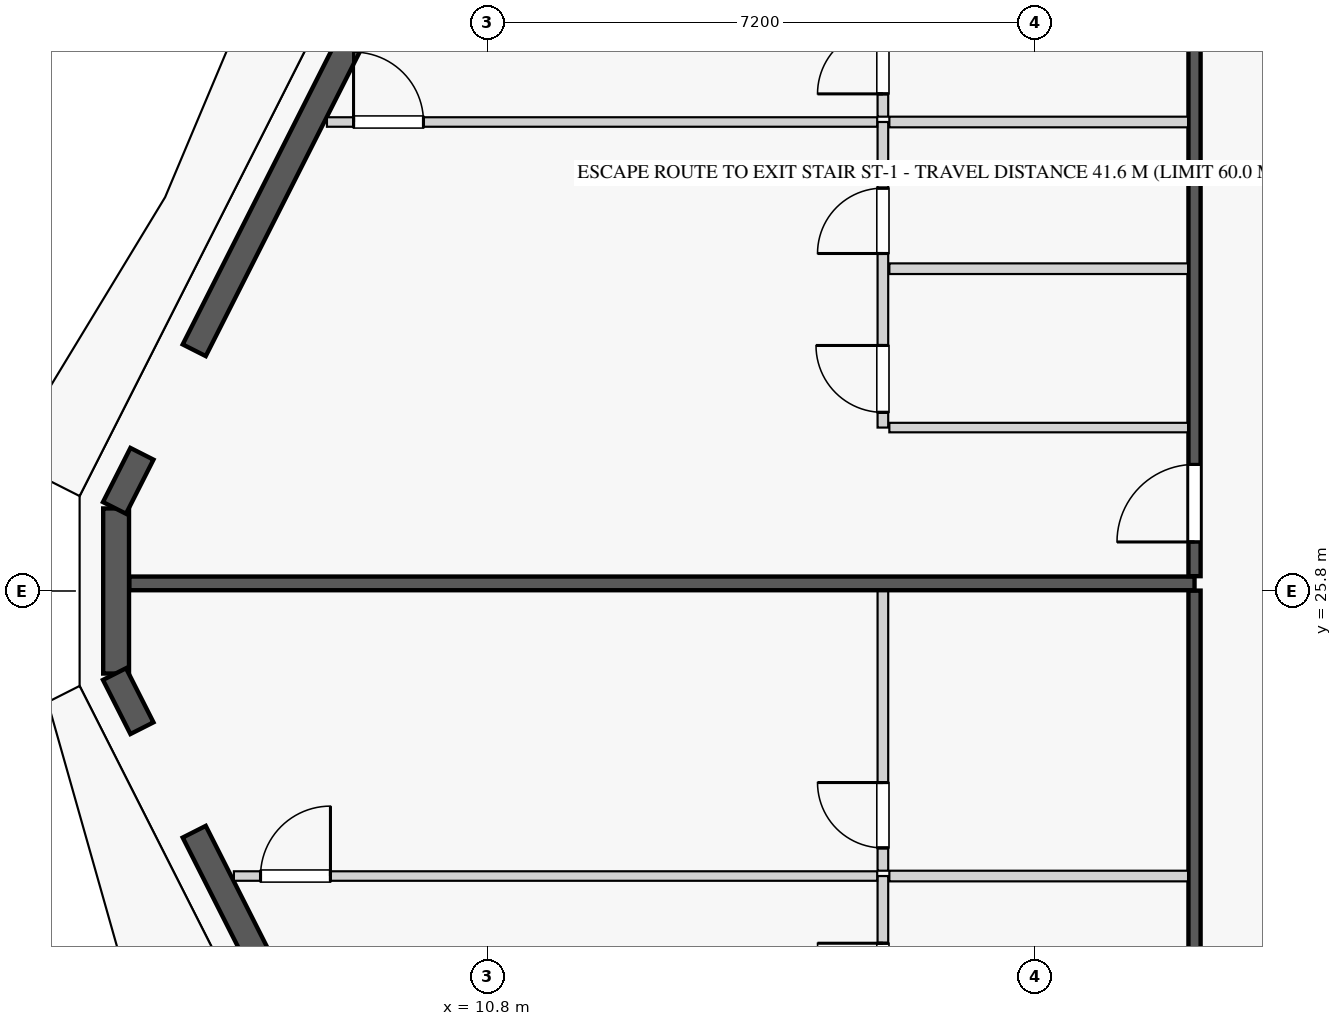
"""IFC4 building model, lengths in metres.
Left out: names, types, materials, properties, quantities, classifications, styles, units other than length and angle.
Written with IfcOpenShell. Run it as: python <this file> out.ifc"""

import sys

from ifc_helpers import new_model, si_unit, direction, frame, frame_2d, origin, origin_2d, place, context, subcontext, project, spatial, rectangle, extrude, element, fill, save


model = new_model("IFC4")
c1 = context("Model", 3, precision=1e-05, world=origin(), true_north=direction((0.0, 1.0)))
c2 = subcontext(c1, "Body", "Model", "MODEL_VIEW")
j1 = project(units=[si_unit("LENGTHUNIT", "METRE"), si_unit("PLANEANGLEUNIT", "RADIAN")], contexts=[c1])
p1 = place(None, origin())
s1 = spatial("IfcSite", under=j1, at=p1, CompositionType="ELEMENT")
p2 = place(p1, origin())
s2 = spatial("IfcBuilding", under=s1, at=p2, CompositionType="ELEMENT")
p3 = place(p2, frame((0.0, 0.0, 35.55)))
s3 = spatial("IfcBuildingStorey", under=s2, at=p3, CompositionType="ELEMENT", Elevation=35.55)
for number, where, z_axis, x_axis in (
    (1, (6.632, 28.286, 0.0), (0.0, 0.0, 1.0), (1.0, 0.0, 0.0)),
    (2, (6.632, 23.314, 0.0), (0.0, 0.0, 1.0), (1.0, 0.0, 0.0)),
):
    element("IfcColumn", number, at=place(p3, frame(where, z_axis=z_axis, x_axis=x_axis)), inside=s3, PredefinedType="COLUMN", context=c2, shape_type="SweptSolid", body=[
        extrude(rectangle(XDim=1.2, YDim=1.2, at=origin_2d()), origin(), (0.0, 0.0, 1.0), 3.55),
    ])
p4 = place(p3, frame((6.632, 25.8, 0.0), z_axis=(0.0, 0.0, 1.0), x_axis=(0.0, -1.0, 0.0)))
e3 = element("IfcColumn", 3, at=p4, inside=s3, PredefinedType="PILASTER", context=c2, shape_type="SweptSolid", body=[
    extrude(rectangle(XDim=0.5, YDim=0.35, at=origin_2d()), origin(), (0.0, 0.0, 1.0), 3.55),
])
p5 = place(p3, frame((5.912, 26.886, 0.0), z_axis=(0.0, 0.0, 1.0), x_axis=(0.0, -1.0, 0.0)))
e4 = element("IfcWall", 4, at=p5, inside=s3, PredefinedType="STANDARD", context=c2, shape_type="SweptSolid", body=[
    extrude(rectangle(XDim=2.172, YDim=0.34, at=frame_2d((1.086, 0.0))), origin(), (0.0, 0.0, 1.0), 3.33),
])
p6 = place(p5, frame((1.246, 0.0, 0.75)))
e5 = element("IfcOpeningElement", 5, at=p6, cuts=e4, PredefinedType="OPENING", context=c2, shape_type="SweptSolid", body=[
    extrude(rectangle(XDim=0.686, YDim=2.0, at=frame_2d((0.343, 1.0))), frame((0.0, 0.18, 0.0), z_axis=(0.0, -1.0, 0.0), x_axis=(1.0, 0.0, 0.0)), (0.0, 0.0, 1.0), 0.36),
])
p7 = place(p3, frame((9.335, 33.699, 0.0), z_axis=(0.0, 0.0, 1.0), x_axis=(-0.451590635984, -0.892225250422, 0.0)))
e6 = element("IfcWall", 6, at=p7, inside=s3, PredefinedType="STANDARD", context=c2, shape_type="SweptSolid", body=[
    extrude(rectangle(XDim=5.303, YDim=0.34, at=frame_2d((2.652, 0.0))), origin(), (0.0, 0.0, 1.0), 2.787),
])
p8 = place(p7, frame((0.308, 0.0, 0.75)))
e7 = element("IfcOpeningElement", 7, at=p8, cuts=e6, PredefinedType="OPENING", context=c2, shape_type="SweptSolid", body=[
    extrude(rectangle(XDim=1.1, YDim=1.887, at=frame_2d((0.55, 0.943))), frame((0.0, 0.18, 0.0), z_axis=(0.0, -1.0, 0.0), x_axis=(1.0, 0.0, 0.0)), (0.0, 0.0, 1.0), 0.36),
])
p9 = place(p7, frame((3.08, 0.0, 0.75)))
e8 = element("IfcOpeningElement", 8, at=p9, cuts=e6, PredefinedType="OPENING", context=c2, shape_type="SweptSolid", body=[
    extrude(rectangle(XDim=1.1, YDim=1.887, at=frame_2d((0.55, 0.943))), frame((0.0, 0.18, 0.0), z_axis=(0.0, -1.0, 0.0), x_axis=(1.0, 0.0, 0.0)), (0.0, 0.0, 1.0), 0.36),
])
for number, where, z_axis, x_axis in (
    (9, (6.252, 27.605, 0.0), (0.0, 0.0, 1.0), (-0.452, -0.892, 0.0)),
    (10, (5.891, 24.707, 0.0), (0.0, 0.0, 1.0), (0.452, -0.892, 0.0)),
):
    element("IfcWall", number, at=place(p3, frame(where, z_axis=z_axis, x_axis=x_axis)), inside=s3, PredefinedType="STANDARD", context=c2, shape_type="SweptSolid", body=[
        extrude(rectangle(XDim=0.798, YDim=0.34, at=frame_2d((0.399, 0.0))), origin(), (0.0, 0.0, 1.0), 3.33),
    ])
p10 = place(p3, frame((6.94, 22.633, 0.0), z_axis=(0.0, 0.0, 1.0), x_axis=(0.451572088722, -0.892234637686, 0.0)))
e11 = element("IfcWall", 11, at=p10, inside=s3, PredefinedType="STANDARD", context=c2, shape_type="SweptSolid", body=[
    extrude(rectangle(XDim=5.304, YDim=0.34, at=frame_2d((2.652, 0.0))), origin(), (0.0, 0.0, 1.0), 2.787),
])
p11 = place(p10, frame((2.102, 0.0, 0.75)))
e12 = element("IfcOpeningElement", 12, at=p11, cuts=e11, PredefinedType="OPENING", context=c2, shape_type="SweptSolid", body=[
    extrude(rectangle(XDim=1.1, YDim=1.887, at=frame_2d((0.55, 0.943))), frame((0.0, 0.18, 0.0), z_axis=(0.0, -1.0, 0.0), x_axis=(1.0, 0.0, 0.0)), (0.0, 0.0, 1.0), 0.36),
])
p12 = place(p3, frame((20.1, 16.045, 0.0), z_axis=(0.0, 0.0, 1.0), x_axis=(0.0, 1.0, 0.0)))
e13 = element("IfcWall", 13, at=p12, inside=s3, PredefinedType="PARTITIONING", context=c2, shape_type="SweptSolid", body=[
    extrude(rectangle(XDim=9.76, YDim=0.16, at=frame_2d((4.88, 0.0))), origin(), (0.0, 0.0, 1.0), 2.7),
])
p13 = place(p12, frame((0.45, 0.0, 0.0)))
e14 = element("IfcOpeningElement", 14, at=p13, cuts=e13, PredefinedType="OPENING", context=c2, shape_type="SweptSolid", body=[
    extrude(rectangle(XDim=1.02, YDim=2.25, at=frame_2d((0.51, 1.125))), frame((0.0, 0.09, 0.0), z_axis=(0.0, -1.0, 0.0), x_axis=(1.0, 0.0, 0.0)), (0.0, 0.0, 1.0), 0.18),
])
p14 = place(p3, frame((16.0, 18.0, 0.0), z_axis=(0.0, 0.0, 1.0), x_axis=(0.0, 1.0, 0.0)))
e15 = element("IfcWall", 15, at=p14, inside=s3, PredefinedType="PLUMBINGWALL", context=c2, shape_type="SweptSolid", body=[
    extrude(rectangle(XDim=4.05, YDim=0.14, at=frame_2d((2.025, 0.0))), origin(), (0.0, 0.0, 1.0), 3.33),
])
p15 = place(p14, frame((0.2, 0.0, 0.0)))
e16 = element("IfcOpeningElement", 16, at=p15, cuts=e15, PredefinedType="OPENING", context=c2, shape_type="SweptSolid", body=[
    extrude(rectangle(XDim=0.88, YDim=2.15, at=frame_2d((0.44, 1.075))), frame((0.0, 0.08, 0.0), z_axis=(0.0, -1.0, 0.0), x_axis=(1.0, 0.0, 0.0)), (0.0, 0.0, 1.0), 0.16),
])
p16 = place(p14, frame((2.306, 0.0, 0.0)))
e17 = element("IfcOpeningElement", 17, at=p16, cuts=e15, PredefinedType="OPENING", context=c2, shape_type="SweptSolid", body=[
    extrude(rectangle(XDim=0.86, YDim=2.1, at=frame_2d((0.43, 1.05))), frame((0.0, 0.08, 0.0), z_axis=(0.0, -1.0, 0.0), x_axis=(1.0, 0.0, 0.0)), (0.0, 0.0, 1.0), 0.16),
])
p17 = place(p3, frame((16.0, 22.12, 0.0), z_axis=(0.0, 0.0, 1.0), x_axis=(0.0, 1.0, 0.0)))
e18 = element("IfcWall", 18, at=p17, inside=s3, PredefinedType="PLUMBINGWALL", context=c2, shape_type="SweptSolid", body=[
    extrude(rectangle(XDim=3.685, YDim=0.14, at=frame_2d((1.842, 0.0))), origin(), (0.0, 0.0, 1.0), 3.33),
])
p18 = place(p17, frame((0.3, 0.0, 0.0)))
e19 = element("IfcOpeningElement", 19, at=p18, cuts=e18, PredefinedType="OPENING", context=c2, shape_type="SweptSolid", body=[
    extrude(rectangle(XDim=0.86, YDim=2.1, at=frame_2d((0.43, 1.05))), frame((0.0, 0.08, 0.0), z_axis=(0.0, -1.0, 0.0), x_axis=(1.0, 0.0, 0.0)), (0.0, 0.0, 1.0), 0.16),
])
p19 = place(p3, frame((16.085, 22.05, 0.0), z_axis=(0.0, 0.0, 1.0), x_axis=(1.0, 0.0, 0.0)))
e20 = element("IfcWall", 20, at=p19, inside=s3, PredefinedType="PLUMBINGWALL", context=c2, shape_type="SweptSolid", body=[
    extrude(rectangle(XDim=3.93, YDim=0.14, at=frame_2d((1.965, 0.0))), origin(), (0.0, 0.0, 1.0), 3.33),
])
p20 = place(p3, frame((7.462, 22.05, 0.0), z_axis=(0.0, 0.0, 1.0), x_axis=(1.0, 0.0, 0.0)))
e21 = element("IfcWall", 21, at=p20, inside=s3, PredefinedType="PARTITIONING", context=c2, shape_type="SweptSolid", body=[
    extrude(rectangle(XDim=8.463, YDim=0.125, at=frame_2d((4.231, 0.0))), origin(), (0.0, 0.0, 1.0), 3.33),
])
p21 = place(p20, frame((0.35, 0.0, 0.0)))
e22 = element("IfcOpeningElement", 22, at=p21, cuts=e21, PredefinedType="OPENING", context=c2, shape_type="SweptSolid", body=[
    extrude(rectangle(XDim=0.92, YDim=2.15, at=frame_2d((0.46, 1.075))), frame((0.0, 0.073, 0.0), z_axis=(0.0, -1.0, 0.0), x_axis=(1.0, 0.0, 0.0)), (0.0, 0.0, 1.0), 0.145),
])
p22 = place(p3, frame((6.087, 25.9, 0.0), z_axis=(0.0, 0.0, 1.0), x_axis=(1.0, 0.0, 0.0)))
e23 = element("IfcWall", 23, at=p22, inside=s3, PredefinedType="PARTITIONING", context=c2, shape_type="SweptSolid", body=[
    extrude(rectangle(XDim=14.013, YDim=0.18, at=frame_2d((7.007, 0.0))), origin(), (0.0, 0.0, 1.0), 3.33),
])
p23 = place(p3, frame((20.1, 25.995, 0.0), z_axis=(0.0, 0.0, 1.0), x_axis=(0.0, 1.0, 0.0)))
e24 = element("IfcWall", 24, at=p23, inside=s3, PredefinedType="PARTITIONING", context=c2, shape_type="SweptSolid", body=[
    extrude(rectangle(XDim=9.76, YDim=0.16, at=frame_2d((4.88, 0.0))), origin(), (0.0, 0.0, 1.0), 2.7),
])
p24 = place(p23, frame((0.45, 0.0, 0.0)))
e25 = element("IfcOpeningElement", 25, at=p24, cuts=e24, PredefinedType="OPENING", context=c2, shape_type="SweptSolid", body=[
    extrude(rectangle(XDim=1.02, YDim=2.25, at=frame_2d((0.51, 1.125))), frame((0.0, 0.09, 0.0), z_axis=(0.0, -1.0, 0.0), x_axis=(1.0, 0.0, 0.0)), (0.0, 0.0, 1.0), 0.18),
])
p25 = place(p3, frame((16.085, 27.95, 0.0), z_axis=(0.0, 0.0, 1.0), x_axis=(1.0, 0.0, 0.0)))
e26 = element("IfcWall", 26, at=p25, inside=s3, PredefinedType="PARTITIONING", context=c2, shape_type="SweptSolid", body=[
    extrude(rectangle(XDim=3.93, YDim=0.125, at=frame_2d((1.965, 0.0))), origin(), (0.0, 0.0, 1.0), 3.33),
])
p26 = place(p3, frame((16.0, 27.95, 0.0), z_axis=(0.0, 0.0, 1.0), x_axis=(0.0, 1.0, 0.0)))
e27 = element("IfcWall", 27, at=p26, inside=s3, PredefinedType="PLUMBINGWALL", context=c2, shape_type="SweptSolid", body=[
    extrude(rectangle(XDim=4.02, YDim=0.14, at=frame_2d((2.01, 0.0))), origin(), (0.0, 0.0, 1.0), 3.33),
])
p27 = place(p26, frame((0.2, 0.0, 0.0)))
e28 = element("IfcOpeningElement", 28, at=p27, cuts=e27, PredefinedType="OPENING", context=c2, shape_type="SweptSolid", body=[
    extrude(rectangle(XDim=0.88, YDim=2.15, at=frame_2d((0.44, 1.075))), frame((0.0, 0.08, 0.0), z_axis=(0.0, -1.0, 0.0), x_axis=(1.0, 0.0, 0.0)), (0.0, 0.0, 1.0), 0.16),
])
p28 = place(p26, frame((2.29, 0.0, 0.0)))
e29 = element("IfcOpeningElement", 29, at=p28, cuts=e27, PredefinedType="OPENING", context=c2, shape_type="SweptSolid", body=[
    extrude(rectangle(XDim=0.86, YDim=2.1, at=frame_2d((0.43, 1.05))), frame((0.0, 0.08, 0.0), z_axis=(0.0, -1.0, 0.0), x_axis=(1.0, 0.0, 0.0)), (0.0, 0.0, 1.0), 0.16),
])
p29 = place(p3, frame((16.0, 32.04, 0.0), z_axis=(0.0, 0.0, 1.0), x_axis=(0.0, 1.0, 0.0)))
e30 = element("IfcWall", 30, at=p29, inside=s3, PredefinedType="PLUMBINGWALL", context=c2, shape_type="SweptSolid", body=[
    extrude(rectangle(XDim=3.715, YDim=0.14, at=frame_2d((1.857, 0.0))), origin(), (0.0, 0.0, 1.0), 3.33),
])
p30 = place(p29, frame((0.3, 0.0, 0.0)))
e31 = element("IfcOpeningElement", 31, at=p30, cuts=e30, PredefinedType="OPENING", context=c2, shape_type="SweptSolid", body=[
    extrude(rectangle(XDim=0.86, YDim=2.1, at=frame_2d((0.43, 1.05))), frame((0.0, 0.08, 0.0), z_axis=(0.0, -1.0, 0.0), x_axis=(1.0, 0.0, 0.0)), (0.0, 0.0, 1.0), 0.16),
])
p31 = place(p3, frame((16.085, 31.97, 0.0), z_axis=(0.0, 0.0, 1.0), x_axis=(1.0, 0.0, 0.0)))
e32 = element("IfcWall", 32, at=p31, inside=s3, PredefinedType="PLUMBINGWALL", context=c2, shape_type="SweptSolid", body=[
    extrude(rectangle(XDim=3.93, YDim=0.14, at=frame_2d((1.965, 0.0))), origin(), (0.0, 0.0, 1.0), 3.33),
])
p32 = place(p3, frame((8.686, 31.97, 0.0), z_axis=(0.0, 0.0, 1.0), x_axis=(1.0, 0.0, 0.0)))
e33 = element("IfcWall", 33, at=p32, inside=s3, PredefinedType="PARTITIONING", context=c2, shape_type="SweptSolid", body=[
    extrude(rectangle(XDim=7.239, YDim=0.125, at=frame_2d((3.62, 0.0))), origin(), (0.0, 0.0, 1.0), 3.33),
])
p33 = place(p32, frame((0.35, 0.0, 0.0)))
e34 = element("IfcOpeningElement", 34, at=p33, cuts=e33, PredefinedType="OPENING", context=c2, shape_type="SweptSolid", body=[
    extrude(rectangle(XDim=0.92, YDim=2.15, at=frame_2d((0.46, 1.075))), frame((0.0, 0.073, 0.0), z_axis=(0.0, -1.0, 0.0), x_axis=(1.0, 0.0, 0.0)), (0.0, 0.0, 1.0), 0.145),
])
p34 = place(p3, frame((16.085, 30.04, 0.0), z_axis=(0.0, 0.0, 1.0), x_axis=(1.0, 0.0, 0.0)))
e35 = element("IfcWall", 35, at=p34, inside=s3, PredefinedType="PLUMBINGWALL", context=c2, shape_type="SweptSolid", body=[
    extrude(rectangle(XDim=3.93, YDim=0.14, at=frame_2d((1.965, 0.0))), origin(), (0.0, 0.0, 1.0), 3.33),
])
p35 = place(p8, origin())
e36 = element("IfcWindow", 36, at=p35, inside=s3, PartitioningType="SINGLE_PANEL", PredefinedType="WINDOW", context=c2, shape_type="SweptSolid", body=[
    extrude(rectangle(XDim=1.1, YDim=1.887, at=frame_2d((0.55, 0.943))), frame((0.0, 0.03, 0.0), z_axis=(0.0, -1.0, 0.0), x_axis=(1.0, 0.0, 0.0)), (0.0, 0.0, 1.0), 0.06),
])
fill(e7, e36)
p36 = place(p16, origin())
e37 = element("IfcDoor", 37, at=p36, inside=s3, OperationType="SINGLE_SWING_RIGHT", PredefinedType="DOOR", context=c2, shape_type="SweptSolid", body=[
    extrude(rectangle(XDim=0.86, YDim=2.1, at=frame_2d((0.43, 1.05))), frame((0.0, 0.025, 0.0), z_axis=(0.0, -1.0, 0.0), x_axis=(1.0, 0.0, 0.0)), (0.0, 0.0, 1.0), 0.05),
])
fill(e17, e37)
p37 = place(p18, origin())
e38 = element("IfcDoor", 38, at=p37, inside=s3, OperationType="SINGLE_SWING_RIGHT", PredefinedType="DOOR", context=c2, shape_type="SweptSolid", body=[
    extrude(rectangle(XDim=0.86, YDim=2.1, at=frame_2d((0.43, 1.05))), frame((0.0, 0.025, 0.0), z_axis=(0.0, -1.0, 0.0), x_axis=(1.0, 0.0, 0.0)), (0.0, 0.0, 1.0), 0.05),
])
fill(e19, e38)
p38 = place(p21, origin())
e39 = element("IfcDoor", 39, at=p38, inside=s3, OperationType="SINGLE_SWING_RIGHT", PredefinedType="DOOR", context=c2, shape_type="SweptSolid", body=[
    extrude(rectangle(XDim=0.92, YDim=2.15, at=frame_2d((0.46, 1.075))), frame((0.0, 0.025, 0.0), z_axis=(0.0, -1.0, 0.0), x_axis=(1.0, 0.0, 0.0)), (0.0, 0.0, 1.0), 0.05),
])
fill(e22, e39)
p39 = place(p27, origin())
e40 = element("IfcDoor", 40, at=p39, inside=s3, OperationType="SINGLE_SWING_RIGHT", PredefinedType="DOOR", context=c2, shape_type="SweptSolid", body=[
    extrude(rectangle(XDim=0.88, YDim=2.15, at=frame_2d((0.44, 1.075))), frame((0.0, 0.025, 0.0), z_axis=(0.0, -1.0, 0.0), x_axis=(1.0, 0.0, 0.0)), (0.0, 0.0, 1.0), 0.05),
])
fill(e28, e40)
p40 = place(p28, origin())
e41 = element("IfcDoor", 41, at=p40, inside=s3, OperationType="SINGLE_SWING_LEFT", PredefinedType="DOOR", context=c2, shape_type="SweptSolid", body=[
    extrude(rectangle(XDim=0.86, YDim=2.1, at=frame_2d((0.43, 1.05))), frame((0.0, 0.025, 0.0), z_axis=(0.0, -1.0, 0.0), x_axis=(1.0, 0.0, 0.0)), (0.0, 0.0, 1.0), 0.05),
])
fill(e29, e41)
p41 = place(p30, origin())
e42 = element("IfcDoor", 42, at=p41, inside=s3, OperationType="SINGLE_SWING_LEFT", PredefinedType="DOOR", context=c2, shape_type="SweptSolid", body=[
    extrude(rectangle(XDim=0.86, YDim=2.1, at=frame_2d((0.43, 1.05))), frame((0.0, 0.025, 0.0), z_axis=(0.0, -1.0, 0.0), x_axis=(1.0, 0.0, 0.0)), (0.0, 0.0, 1.0), 0.05),
])
fill(e31, e42)
p42 = place(p24, origin())
e43 = element("IfcDoor", 43, at=p42, inside=s3, OperationType="SINGLE_SWING_LEFT", PredefinedType="DOOR", context=c2, shape_type="SweptSolid", body=[
    extrude(rectangle(XDim=1.02, YDim=2.25, at=frame_2d((0.51, 1.125))), frame((0.0, 0.025, 0.0), z_axis=(0.0, -1.0, 0.0), x_axis=(1.0, 0.0, 0.0)), (0.0, 0.0, 1.0), 0.05),
])
fill(e25, e43)
p43 = place(p33, origin())
e44 = element("IfcDoor", 44, at=p43, inside=s3, OperationType="SINGLE_SWING_LEFT", PredefinedType="DOOR", context=c2, shape_type="SweptSolid", body=[
    extrude(rectangle(XDim=0.92, YDim=2.15, at=frame_2d((0.46, 1.075))), frame((0.0, 0.025, 0.0), z_axis=(0.0, -1.0, 0.0), x_axis=(1.0, 0.0, 0.0)), (0.0, 0.0, 1.0), 0.05),
])
fill(e34, e44)
p44 = place(p9, origin())
e45 = element("IfcWindow", 45, at=p44, inside=s3, PartitioningType="SINGLE_PANEL", PredefinedType="WINDOW", context=c2, shape_type="SweptSolid", body=[
    extrude(rectangle(XDim=1.1, YDim=1.887, at=frame_2d((0.55, 0.943))), frame((0.0, 0.03, 0.0), z_axis=(0.0, -1.0, 0.0), x_axis=(1.0, 0.0, 0.0)), (0.0, 0.0, 1.0), 0.06),
])
fill(e8, e45)
p45 = place(p6, origin())
e46 = element("IfcWindow", 46, at=p45, inside=s3, PartitioningType="SINGLE_PANEL", PredefinedType="WINDOW", context=c2, shape_type="SweptSolid", body=[
    extrude(rectangle(XDim=0.686, YDim=2.0, at=frame_2d((0.343, 1.0))), frame((0.0, 0.03, 0.0), z_axis=(0.0, -1.0, 0.0), x_axis=(1.0, 0.0, 0.0)), (0.0, 0.0, 1.0), 0.06),
])
fill(e5, e46)
save(model, sys.argv[1])
